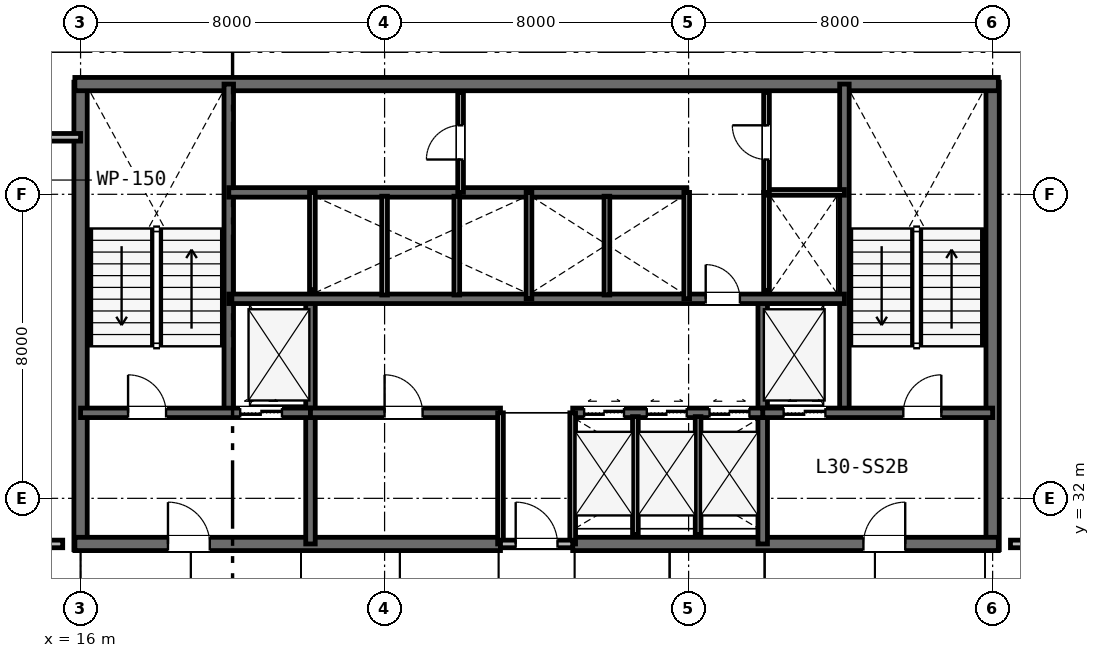
"""IFC4 building model, lengths in metres.
Left out: names, types, materials, properties, quantities, classifications, styles, units other than length and angle.
Written with IfcOpenShell. Run it as: python <this file> out.ifc"""

import sys

from ifc_helpers import new_model, si_unit, direction, frame, frame_2d, origin, place, context, subcontext, project, spatial, rectangle, extrude, element, fill, save


model = new_model("IFC4")
c1 = context("Model", 3, precision=1e-05, world=origin(), true_north=direction((0.0, 1.0)))
c2 = subcontext(c1, "Body", "Model", "MODEL_VIEW")
j1 = project(units=[si_unit("LENGTHUNIT", "METRE"), si_unit("PLANEANGLEUNIT", "RADIAN")], contexts=[c1])
p1 = place(None, origin())
s1 = spatial("IfcSite", under=j1, at=p1, CompositionType="ELEMENT")
p2 = place(p1, origin())
s2 = spatial("IfcBuilding", under=s1, at=p2, CompositionType="ELEMENT")
p3 = place(p2, frame((0.0, 0.0, 118.8)))
s3 = spatial("IfcBuildingStorey", under=s2, at=p3, CompositionType="ELEMENT", Elevation=118.8)
for number, where, z_axis, x_axis in (
    (1, (16.0, 30.65, 0.0), (0.0, 0.0, 1.0), (0.0, 1.0, 0.0)),
    (2, (40.0, 30.65, 0.0), (0.0, 0.0, 1.0), (0.0, 1.0, 0.0)),
):
    element("IfcWall", number, at=place(p3, frame(where, z_axis=z_axis, x_axis=x_axis)), inside=s3, PredefinedType="SHEAR", context=c2, shape_type="SweptSolid", body=[
        extrude(rectangle(XDim=12.3, YDim=0.35, at=frame_2d((6.15, 0.0))), origin(), (0.0, 0.0, 1.0), 3.6),
    ])
p4 = place(p3, frame((15.85, 42.9, 0.0), z_axis=(0.0, 0.0, 1.0), x_axis=(1.0, 0.0, 0.0)))
e3 = element("IfcWall", 3, at=p4, inside=s3, PredefinedType="SHEAR", context=c2, shape_type="SweptSolid", body=[
    extrude(rectangle(XDim=24.3, YDim=0.35, at=frame_2d((12.15, 0.0))), origin(), (0.0, 0.0, 1.0), 3.6),
])
p5 = place(p3, frame((15.85, 30.8, 0.0), z_axis=(0.0, 0.0, 1.0), x_axis=(1.0, 0.0, 0.0)))
e4 = element("IfcWall", 4, at=p5, inside=s3, PredefinedType="SHEAR", context=c2, shape_type="SweptSolid", body=[
    extrude(rectangle(XDim=11.2, YDim=0.35, at=frame_2d((5.6, 0.0))), origin(), (0.0, 0.0, 1.0), 3.6),
])
p6 = place(p5, frame((2.45, 0.0, 0.0)))
e5 = element("IfcOpeningElement", 5, at=p6, cuts=e4, PredefinedType="OPENING", context=c2, shape_type="SweptSolid", body=[
    extrude(rectangle(XDim=1.1, YDim=2.15, at=frame_2d((0.55, 1.075))), frame((0.0, 0.185, 0.0), z_axis=(0.0, -1.0, 0.0), x_axis=(1.0, 0.0, 0.0)), (0.0, 0.0, 1.0), 0.37),
])
p7 = place(p3, frame((28.95, 30.8, 0.0), z_axis=(0.0, 0.0, 1.0), x_axis=(1.0, 0.0, 0.0)))
e6 = element("IfcWall", 6, at=p7, inside=s3, PredefinedType="SHEAR", context=c2, shape_type="SweptSolid", body=[
    extrude(rectangle(XDim=11.2, YDim=0.35, at=frame_2d((5.6, 0.0))), origin(), (0.0, 0.0, 1.0), 3.6),
])
p8 = place(p7, frame((7.65, 0.0, 0.0)))
e7 = element("IfcOpeningElement", 7, at=p8, cuts=e6, PredefinedType="OPENING", context=c2, shape_type="SweptSolid", body=[
    extrude(rectangle(XDim=1.1, YDim=2.15, at=frame_2d((0.55, 1.075))), frame((0.0, 0.185, 0.0), z_axis=(0.0, -1.0, 0.0), x_axis=(1.0, 0.0, 0.0)), (0.0, 0.0, 1.0), 0.37),
])
for number, where, z_axis, x_axis in (
    (8, (19.9, 34.25, 0.0), (0.0, 0.0, 1.0), (0.0, 1.0, 0.0)),
    (9, (36.1, 34.25, 0.0), (0.0, 0.0, 1.0), (0.0, 1.0, 0.0)),
):
    element("IfcWall", number, at=place(p3, frame(where, z_axis=z_axis, x_axis=x_axis)), inside=s3, PredefinedType="SHEAR", context=c2, shape_type="SweptSolid", body=[
        extrude(rectangle(XDim=8.65, YDim=0.25, at=frame_2d((4.325, 0.0))), origin(), (0.0, 0.0, 1.0), 3.6),
    ])
for number, where, z_axis, x_axis in (
    (10, (22.05, 30.8, 0.0), (0.0, 0.0, 1.0), (0.0, 1.0, 0.0)),
    (11, (33.95, 30.8, 0.0), (0.0, 0.0, 1.0), (0.0, 1.0, 0.0)),
):
    element("IfcWall", number, at=place(p3, frame(where, z_axis=z_axis, x_axis=x_axis)), inside=s3, PredefinedType="SHEAR", context=c2, shape_type="SweptSolid", body=[
        extrude(rectangle(XDim=6.45, YDim=0.25, at=frame_2d((3.225, 0.0))), origin(), (0.0, 0.0, 1.0), 3.6),
    ])
p9 = place(p3, frame((16.0, 34.25, 0.0), z_axis=(0.0, 0.0, 1.0), x_axis=(1.0, 0.0, 0.0)))
e12 = element("IfcWall", 12, at=p9, inside=s3, PredefinedType="SHEAR", context=c2, shape_type="SweptSolid", body=[
    extrude(rectangle(XDim=6.05, YDim=0.25, at=frame_2d((3.025, 0.0))), origin(), (0.0, 0.0, 1.0), 3.6),
])
p10 = place(p9, frame((1.25, 0.0, 0.0)))
e13 = element("IfcOpeningElement", 13, at=p10, cuts=e12, PredefinedType="OPENING", context=c2, shape_type="SweptSolid", body=[
    extrude(rectangle(XDim=1.0, YDim=2.15, at=frame_2d((0.5, 1.075))), frame((0.0, 0.135, 0.0), z_axis=(0.0, -1.0, 0.0), x_axis=(1.0, 0.0, 0.0)), (0.0, 0.0, 1.0), 0.27),
])
p11 = place(p9, frame((4.2, 0.0, 0.0)))
e14 = element("IfcOpeningElement", 14, at=p11, cuts=e12, PredefinedType="OPENING", context=c2, shape_type="SweptSolid", body=[
    extrude(rectangle(XDim=1.1, YDim=2.15, at=frame_2d((0.55, 1.075))), frame((0.0, 0.135, 0.0), z_axis=(0.0, -1.0, 0.0), x_axis=(1.0, 0.0, 0.0)), (0.0, 0.0, 1.0), 0.27),
])
p12 = place(p3, frame((33.95, 34.25, 0.0), z_axis=(0.0, 0.0, 1.0), x_axis=(1.0, 0.0, 0.0)))
e15 = element("IfcWall", 15, at=p12, inside=s3, PredefinedType="SHEAR", context=c2, shape_type="SweptSolid", body=[
    extrude(rectangle(XDim=6.05, YDim=0.25, at=frame_2d((3.025, 0.0))), origin(), (0.0, 0.0, 1.0), 3.6),
])
p13 = place(p12, frame((3.7, 0.0, 0.0)))
e16 = element("IfcOpeningElement", 16, at=p13, cuts=e15, PredefinedType="OPENING", context=c2, shape_type="SweptSolid", body=[
    extrude(rectangle(XDim=1.0, YDim=2.15, at=frame_2d((0.5, 1.075))), frame((0.0, 0.135, 0.0), z_axis=(0.0, -1.0, 0.0), x_axis=(1.0, 0.0, 0.0)), (0.0, 0.0, 1.0), 0.27),
])
p14 = place(p12, frame((0.55, 0.0, 0.0)))
e17 = element("IfcOpeningElement", 17, at=p14, cuts=e15, PredefinedType="OPENING", context=c2, shape_type="SweptSolid", body=[
    extrude(rectangle(XDim=1.1, YDim=2.15, at=frame_2d((0.55, 1.075))), frame((0.0, 0.135, 0.0), z_axis=(0.0, -1.0, 0.0), x_axis=(1.0, 0.0, 0.0)), (0.0, 0.0, 1.0), 0.27),
])
p15 = place(p3, frame((22.05, 34.25, 0.0), z_axis=(0.0, 0.0, 1.0), x_axis=(1.0, 0.0, 0.0)))
e18 = element("IfcWall", 18, at=p15, inside=s3, PredefinedType="SHEAR", context=c2, shape_type="SweptSolid", body=[
    extrude(rectangle(XDim=5.0, YDim=0.25, at=frame_2d((2.5, 0.0))), origin(), (0.0, 0.0, 1.0), 3.6),
])
p16 = place(p15, frame((1.95, 0.0, 0.0)))
e19 = element("IfcOpeningElement", 19, at=p16, cuts=e18, PredefinedType="OPENING", context=c2, shape_type="SweptSolid", body=[
    extrude(rectangle(XDim=1.0, YDim=2.15, at=frame_2d((0.5, 1.075))), frame((0.0, 0.135, 0.0), z_axis=(0.0, -1.0, 0.0), x_axis=(1.0, 0.0, 0.0)), (0.0, 0.0, 1.0), 0.27),
])
p17 = place(p3, frame((28.95, 34.25, 0.0), z_axis=(0.0, 0.0, 1.0), x_axis=(1.0, 0.0, 0.0)))
e20 = element("IfcWall", 20, at=p17, inside=s3, PredefinedType="SHEAR", context=c2, shape_type="SweptSolid", body=[
    extrude(rectangle(XDim=5.0, YDim=0.25, at=frame_2d((2.5, 0.0))), origin(), (0.0, 0.0, 1.0), 3.6),
])
p18 = place(p17, frame((0.3, 0.0, 0.0)))
e21 = element("IfcOpeningElement", 21, at=p18, cuts=e20, PredefinedType="OPENING", context=c2, shape_type="SweptSolid", body=[
    extrude(rectangle(XDim=1.05, YDim=2.15, at=frame_2d((0.525, 1.075))), frame((0.0, 0.135, 0.0), z_axis=(0.0, -1.0, 0.0), x_axis=(1.0, 0.0, 0.0)), (0.0, 0.0, 1.0), 0.27),
])
p19 = place(p17, frame((1.95, 0.0, 0.0)))
e22 = element("IfcOpeningElement", 22, at=p19, cuts=e20, PredefinedType="OPENING", context=c2, shape_type="SweptSolid", body=[
    extrude(rectangle(XDim=1.05, YDim=2.15, at=frame_2d((0.525, 1.075))), frame((0.0, 0.135, 0.0), z_axis=(0.0, -1.0, 0.0), x_axis=(1.0, 0.0, 0.0)), (0.0, 0.0, 1.0), 0.27),
])
p20 = place(p17, frame((3.6, 0.0, 0.0)))
e23 = element("IfcOpeningElement", 23, at=p20, cuts=e20, PredefinedType="OPENING", context=c2, shape_type="SweptSolid", body=[
    extrude(rectangle(XDim=1.05, YDim=2.15, at=frame_2d((0.525, 1.075))), frame((0.0, 0.135, 0.0), z_axis=(0.0, -1.0, 0.0), x_axis=(1.0, 0.0, 0.0)), (0.0, 0.0, 1.0), 0.27),
])
p21 = place(p3, frame((19.9, 37.25, 0.0), z_axis=(0.0, 0.0, 1.0), x_axis=(1.0, 0.0, 0.0)))
e24 = element("IfcWall", 24, at=p21, inside=s3, PredefinedType="SHEAR", context=c2, shape_type="SweptSolid", body=[
    extrude(rectangle(XDim=16.2, YDim=0.25, at=frame_2d((8.1, 0.0))), origin(), (0.0, 0.0, 1.0), 3.6),
])
p22 = place(p21, frame((12.55, 0.0, 0.0)))
e25 = element("IfcOpeningElement", 25, at=p22, cuts=e24, PredefinedType="OPENING", context=c2, shape_type="SweptSolid", body=[
    extrude(rectangle(XDim=0.9, YDim=2.15, at=frame_2d((0.45, 1.075))), frame((0.0, 0.135, 0.0), z_axis=(0.0, -1.0, 0.0), x_axis=(1.0, 0.0, 0.0)), (0.0, 0.0, 1.0), 0.27),
])
p23 = place(p3, frame((19.9, 40.05, 0.0), z_axis=(0.0, 0.0, 1.0), x_axis=(1.0, 0.0, 0.0)))
e26 = element("IfcWall", 26, at=p23, inside=s3, PredefinedType="SHEAR", context=c2, shape_type="SweptSolid", body=[
    extrude(rectangle(XDim=12.05, YDim=0.25, at=frame_2d((6.025, 0.0))), origin(), (0.0, 0.0, 1.0), 3.6),
])
p24 = place(p3, frame((27.05, 30.8, 0.0), z_axis=(0.0, 0.0, 1.0), x_axis=(0.0, 1.0, 0.0)))
e27 = element("IfcWall", 27, at=p24, inside=s3, PredefinedType="PLUMBINGWALL", context=c2, shape_type="SweptSolid", body=[
    extrude(rectangle(XDim=3.45, YDim=0.15, at=frame_2d((1.725, 0.0))), origin(), (0.0, 0.0, 1.0), 3.01),
])
p25 = place(p3, frame((28.95, 30.8, 0.0), z_axis=(0.0, 0.0, 1.0), x_axis=(0.0, 1.0, 0.0)))
e28 = element("IfcWall", 28, at=p25, inside=s3, PredefinedType="PLUMBINGWALL", context=c2, shape_type="SweptSolid", body=[
    extrude(rectangle(XDim=3.45, YDim=0.15, at=frame_2d((1.725, 0.0))), origin(), (0.0, 0.0, 1.0), 3.33),
])
p26 = place(p3, frame((27.05, 30.8, 0.0), z_axis=(0.0, 0.0, 1.0), x_axis=(1.0, 0.0, 0.0)))
e29 = element("IfcWall", 29, at=p26, inside=s3, PredefinedType="PARTITIONING", context=c2, shape_type="SweptSolid", body=[
    extrude(rectangle(XDim=1.9, YDim=0.2, at=frame_2d((0.95, 0.0))), origin(), (0.0, 0.0, 1.0), 3.01),
])
p27 = place(p26, frame((0.4, 0.0, 0.0)))
e30 = element("IfcOpeningElement", 30, at=p27, cuts=e29, PredefinedType="OPENING", context=c2, shape_type="SweptSolid", body=[
    extrude(rectangle(XDim=1.1, YDim=2.15, at=frame_2d((0.55, 1.075))), frame((0.0, 0.11, 0.0), z_axis=(0.0, -1.0, 0.0), x_axis=(1.0, 0.0, 0.0)), (0.0, 0.0, 1.0), 0.22),
])
for number, where, z_axis, x_axis in (
    (31, (30.6, 31.05, 0.0), (0.0, 0.0, 1.0), (0.0, 1.0, 0.0)),
    (32, (32.25, 31.05, 0.0), (0.0, 0.0, 1.0), (0.0, 1.0, 0.0)),
):
    element("IfcWall", number, at=place(p3, frame(where, z_axis=z_axis, x_axis=x_axis)), inside=s3, PredefinedType="PLUMBINGWALL", context=c2, shape_type="SweptSolid", body=[
        extrude(rectangle(XDim=3.1, YDim=0.15, at=frame_2d((1.55, 0.0))), origin(), (0.0, 0.0, 1.0), 3.33),
    ])
p28 = place(p3, frame((22.1, 37.49, 0.0), z_axis=(0.0, 0.0, 1.0), x_axis=(0.0, 1.0, 0.0)))
e33 = element("IfcWall", 33, at=p28, inside=s3, PredefinedType="PLUMBINGWALL", context=c2, shape_type="SweptSolid", body=[
    extrude(rectangle(XDim=2.56, YDim=0.15, at=frame_2d((1.28, 0.0))), origin(), (0.0, 0.0, 1.0), 3.33),
])
p29 = place(p3, frame((27.8, 37.25, 0.0), z_axis=(0.0, 0.0, 1.0), x_axis=(0.0, 1.0, 0.0)))
e34 = element("IfcWall", 34, at=p29, inside=s3, PredefinedType="PLUMBINGWALL", context=c2, shape_type="SweptSolid", body=[
    extrude(rectangle(XDim=2.8, YDim=0.15, at=frame_2d((1.4, 0.0))), origin(), (0.0, 0.0, 1.0), 3.33),
])
for number, where, z_axis, x_axis in (
    (35, (24.0, 37.35, 0.0), (0.0, 0.0, 1.0), (0.0, 1.0, 0.0)),
    (36, (25.9, 37.35, 0.0), (0.0, 0.0, 1.0), (0.0, 1.0, 0.0)),
):
    element("IfcWall", number, at=place(p3, frame(where, z_axis=z_axis, x_axis=x_axis)), inside=s3, PredefinedType="PLUMBINGWALL", context=c2, shape_type="SweptSolid", body=[
        extrude(rectangle(XDim=2.6, YDim=0.15, at=frame_2d((1.3, 0.0))), origin(), (0.0, 0.0, 1.0), 3.33),
    ])
p30 = place(p3, frame((31.95, 37.25, 0.0), z_axis=(0.0, 0.0, 1.0), x_axis=(0.0, 1.0, 0.0)))
e37 = element("IfcWall", 37, at=p30, inside=s3, PredefinedType="PLUMBINGWALL", context=c2, shape_type="SweptSolid", body=[
    extrude(rectangle(XDim=2.8, YDim=0.15, at=frame_2d((1.4, 0.0))), origin(), (0.0, 0.0, 1.0), 3.33),
])
p31 = place(p3, frame((29.85, 37.35, 0.0), z_axis=(0.0, 0.0, 1.0), x_axis=(0.0, 1.0, 0.0)))
e38 = element("IfcWall", 38, at=p31, inside=s3, PredefinedType="PLUMBINGWALL", context=c2, shape_type="SweptSolid", body=[
    extrude(rectangle(XDim=2.6, YDim=0.15, at=frame_2d((1.3, 0.0))), origin(), (0.0, 0.0, 1.0), 3.33),
])
p32 = place(p3, frame((34.05, 37.473, 0.0), z_axis=(0.0, 0.0, 1.0), x_axis=(0.0, 1.0, 0.0)))
e39 = element("IfcWall", 39, at=p32, inside=s3, PredefinedType="PLUMBINGWALL", context=c2, shape_type="SweptSolid", body=[
    extrude(rectangle(XDim=2.577, YDim=0.15, at=frame_2d((1.288, 0.0))), origin(), (0.0, 0.0, 1.0), 3.33),
])
p33 = place(p3, frame((34.05, 40.05, 0.0), z_axis=(0.0, 0.0, 1.0), x_axis=(1.0, 0.0, 0.0)))
e40 = element("IfcWall", 40, at=p33, inside=s3, PredefinedType="PARTITIONING", context=c2, shape_type="SweptSolid", body=[
    extrude(rectangle(XDim=2.05, YDim=0.15, at=frame_2d((1.025, 0.0))), origin(), (0.0, 0.0, 1.0), 3.33),
])
p34 = place(p3, frame((34.05, 40.05, 0.0), z_axis=(0.0, 0.0, 1.0), x_axis=(0.0, 1.0, 0.0)))
e41 = element("IfcWall", 41, at=p34, inside=s3, PredefinedType="PARTITIONING", context=c2, shape_type="SweptSolid", body=[
    extrude(rectangle(XDim=2.63, YDim=0.15, at=frame_2d((1.315, 0.0))), origin(), (0.0, 0.0, 1.0), 3.33),
])
p35 = place(p34, frame((0.865, 0.0, 0.0)))
e42 = element("IfcOpeningElement", 42, at=p35, cuts=e41, PredefinedType="OPENING", context=c2, shape_type="SweptSolid", body=[
    extrude(rectangle(XDim=0.9, YDim=2.15, at=frame_2d((0.45, 1.075))), frame((0.0, 0.085, 0.0), z_axis=(0.0, -1.0, 0.0), x_axis=(1.0, 0.0, 0.0)), (0.0, 0.0, 1.0), 0.17),
])
p36 = place(p3, frame((26.0, 40.05, 0.0), z_axis=(0.0, 0.0, 1.0), x_axis=(0.0, 1.0, 0.0)))
e43 = element("IfcWall", 43, at=p36, inside=s3, PredefinedType="PARTITIONING", context=c2, shape_type="SweptSolid", body=[
    extrude(rectangle(XDim=2.63, YDim=0.15, at=frame_2d((1.315, 0.0))), origin(), (0.0, 0.0, 1.0), 3.33),
])
p37 = place(p36, frame((0.865, 0.0, 0.0)))
e44 = element("IfcOpeningElement", 44, at=p37, cuts=e43, PredefinedType="OPENING", context=c2, shape_type="SweptSolid", body=[
    extrude(rectangle(XDim=0.9, YDim=2.15, at=frame_2d((0.45, 1.075))), frame((0.0, 0.085, 0.0), z_axis=(0.0, -1.0, 0.0), x_axis=(1.0, 0.0, 0.0)), (0.0, 0.0, 1.0), 0.17),
])
p38 = place(p3, frame((11.4, 30.8, 0.0), z_axis=(0.0, 0.0, 1.0), x_axis=(1.0, 0.0, 0.0)))
e45 = element("IfcWall", 45, at=p38, inside=s3, PredefinedType="PARTITIONING", context=c2, shape_type="SweptSolid", body=[
    extrude(rectangle(XDim=4.13, YDim=0.2, at=frame_2d((2.065, 0.0))), origin(), (0.0, 0.0, 1.0), 2.87),
])
p39 = place(p3, frame((40.47, 30.8, 0.0), z_axis=(0.0, 0.0, 1.0), x_axis=(1.0, 0.0, 0.0)))
e46 = element("IfcWall", 46, at=p39, inside=s3, PredefinedType="PARTITIONING", context=c2, shape_type="SweptSolid", body=[
    extrude(rectangle(XDim=1.73, YDim=0.2, at=frame_2d((0.865, 0.0))), origin(), (0.0, 0.0, 1.0), 2.87),
])
p40 = place(p3, frame((0.1, 41.5, 0.0), z_axis=(0.0, 0.0, 1.0), x_axis=(1.0, 0.0, 0.0)))
e47 = element("IfcWall", 47, at=p40, inside=s3, PredefinedType="PARTITIONING", context=c2, shape_type="SweptSolid", body=[
    extrude(rectangle(XDim=15.9, YDim=0.2, at=frame_2d((7.95, 0.0))), origin(), (0.0, 0.0, 1.0), 2.87),
])
p41 = place(p40, frame((9.877, 0.0, 0.0)))
e48 = element("IfcOpeningElement", 48, at=p41, cuts=e47, PredefinedType="OPENING", context=c2, shape_type="SweptSolid", body=[
    extrude(rectangle(XDim=0.95, YDim=2.15, at=frame_2d((0.475, 1.075))), frame((0.0, 0.11, 0.0), z_axis=(0.0, -1.0, 0.0), x_axis=(1.0, 0.0, 0.0)), (0.0, 0.0, 1.0), 0.22),
])
p42 = place(p27, origin())
e49 = element("IfcDoor", 49, at=p42, inside=s3, OperationType="SINGLE_SWING_LEFT", PredefinedType="DOOR", context=c2, shape_type="SweptSolid", body=[
    extrude(rectangle(XDim=1.1, YDim=2.15, at=frame_2d((0.55, 1.075))), frame((0.0, 0.025, 0.0), z_axis=(0.0, -1.0, 0.0), x_axis=(1.0, 0.0, 0.0)), (0.0, 0.0, 1.0), 0.05),
])
fill(e30, e49)
p43 = place(p10, origin())
e50 = element("IfcDoor", 50, at=p43, inside=s3, OperationType="SINGLE_SWING_LEFT", PredefinedType="DOOR", context=c2, shape_type="SweptSolid", body=[
    extrude(rectangle(XDim=1.0, YDim=2.15, at=frame_2d((0.5, 1.075))), frame((0.0, 0.025, 0.0), z_axis=(0.0, -1.0, 0.0), x_axis=(1.0, 0.0, 0.0)), (0.0, 0.0, 1.0), 0.05),
])
fill(e13, e50)
p44 = place(p13, origin())
e51 = element("IfcDoor", 51, at=p44, inside=s3, OperationType="SINGLE_SWING_RIGHT", PredefinedType="DOOR", context=c2, shape_type="SweptSolid", body=[
    extrude(rectangle(XDim=1.0, YDim=2.15, at=frame_2d((0.5, 1.075))), frame((0.0, 0.025, 0.0), z_axis=(0.0, -1.0, 0.0), x_axis=(1.0, 0.0, 0.0)), (0.0, 0.0, 1.0), 0.05),
])
fill(e16, e51)
p45 = place(p6, origin())
e52 = element("IfcDoor", 52, at=p45, inside=s3, OperationType="SINGLE_SWING_LEFT", PredefinedType="DOOR", context=c2, shape_type="SweptSolid", body=[
    extrude(rectangle(XDim=1.1, YDim=2.15, at=frame_2d((0.55, 1.075))), frame((0.0, 0.025, 0.0), z_axis=(0.0, -1.0, 0.0), x_axis=(1.0, 0.0, 0.0)), (0.0, 0.0, 1.0), 0.05),
])
fill(e5, e52)
p46 = place(p8, origin())
e53 = element("IfcDoor", 53, at=p46, inside=s3, OperationType="SINGLE_SWING_RIGHT", PredefinedType="DOOR", context=c2, shape_type="SweptSolid", body=[
    extrude(rectangle(XDim=1.1, YDim=2.15, at=frame_2d((0.55, 1.075))), frame((0.0, 0.025, 0.0), z_axis=(0.0, -1.0, 0.0), x_axis=(1.0, 0.0, 0.0)), (0.0, 0.0, 1.0), 0.05),
])
fill(e7, e53)
p47 = place(p16, origin())
e54 = element("IfcDoor", 54, at=p47, inside=s3, OperationType="SINGLE_SWING_LEFT", PredefinedType="DOOR", context=c2, shape_type="SweptSolid", body=[
    extrude(rectangle(XDim=1.0, YDim=2.15, at=frame_2d((0.5, 1.075))), frame((0.0, 0.025, 0.0), z_axis=(0.0, -1.0, 0.0), x_axis=(1.0, 0.0, 0.0)), (0.0, 0.0, 1.0), 0.05),
])
fill(e19, e54)
p48 = place(p22, origin())
e55 = element("IfcDoor", 55, at=p48, inside=s3, OperationType="SINGLE_SWING_LEFT", PredefinedType="DOOR", context=c2, shape_type="SweptSolid", body=[
    extrude(rectangle(XDim=0.9, YDim=2.15, at=frame_2d((0.45, 1.075))), frame((0.0, 0.025, 0.0), z_axis=(0.0, -1.0, 0.0), x_axis=(1.0, 0.0, 0.0)), (0.0, 0.0, 1.0), 0.05),
])
fill(e25, e55)
p49 = place(p35, origin())
e56 = element("IfcDoor", 56, at=p49, inside=s3, OperationType="SINGLE_SWING_RIGHT", PredefinedType="DOOR", context=c2, shape_type="SweptSolid", body=[
    extrude(rectangle(XDim=0.9, YDim=2.15, at=frame_2d((0.45, 1.075))), frame((0.0, 0.025, 0.0), z_axis=(0.0, -1.0, 0.0), x_axis=(1.0, 0.0, 0.0)), (0.0, 0.0, 1.0), 0.05),
])
fill(e42, e56)
p50 = place(p37, origin())
e57 = element("IfcDoor", 57, at=p50, inside=s3, OperationType="SINGLE_SWING_LEFT", PredefinedType="DOOR", context=c2, shape_type="SweptSolid", body=[
    extrude(rectangle(XDim=0.9, YDim=2.15, at=frame_2d((0.45, 1.075))), frame((0.0, 0.025, 0.0), z_axis=(0.0, -1.0, 0.0), x_axis=(1.0, 0.0, 0.0)), (0.0, 0.0, 1.0), 0.05),
])
fill(e44, e57)
p51 = place(p11, origin())
e58 = element("IfcDoor", 58, at=p51, inside=s3, OperationType="DOUBLE_DOOR_SLIDING", PredefinedType="DOOR", context=c2, shape_type="SweptSolid", body=[
    extrude(rectangle(XDim=1.1, YDim=2.15, at=frame_2d((0.55, 1.075))), frame((0.0, 0.025, 0.0), z_axis=(0.0, -1.0, 0.0), x_axis=(1.0, 0.0, 0.0)), (0.0, 0.0, 1.0), 0.05),
])
fill(e14, e58)
p52 = place(p14, origin())
e59 = element("IfcDoor", 59, at=p52, inside=s3, OperationType="DOUBLE_DOOR_SLIDING", PredefinedType="DOOR", context=c2, shape_type="SweptSolid", body=[
    extrude(rectangle(XDim=1.1, YDim=2.15, at=frame_2d((0.55, 1.075))), frame((0.0, 0.025, 0.0), z_axis=(0.0, -1.0, 0.0), x_axis=(1.0, 0.0, 0.0)), (0.0, 0.0, 1.0), 0.05),
])
fill(e17, e59)
p53 = place(p18, origin())
e60 = element("IfcDoor", 60, at=p53, inside=s3, OperationType="DOUBLE_DOOR_SLIDING", PredefinedType="DOOR", context=c2, shape_type="SweptSolid", body=[
    extrude(rectangle(XDim=1.05, YDim=2.15, at=frame_2d((0.525, 1.075))), frame((0.0, 0.025, 0.0), z_axis=(0.0, -1.0, 0.0), x_axis=(1.0, 0.0, 0.0)), (0.0, 0.0, 1.0), 0.05),
])
fill(e21, e60)
p54 = place(p19, origin())
e61 = element("IfcDoor", 61, at=p54, inside=s3, OperationType="DOUBLE_DOOR_SLIDING", PredefinedType="DOOR", context=c2, shape_type="SweptSolid", body=[
    extrude(rectangle(XDim=1.05, YDim=2.15, at=frame_2d((0.525, 1.075))), frame((0.0, 0.025, 0.0), z_axis=(0.0, -1.0, 0.0), x_axis=(1.0, 0.0, 0.0)), (0.0, 0.0, 1.0), 0.05),
])
fill(e22, e61)
p55 = place(p20, origin())
e62 = element("IfcDoor", 62, at=p55, inside=s3, OperationType="DOUBLE_DOOR_SLIDING", PredefinedType="DOOR", context=c2, shape_type="SweptSolid", body=[
    extrude(rectangle(XDim=1.05, YDim=2.15, at=frame_2d((0.525, 1.075))), frame((0.0, 0.025, 0.0), z_axis=(0.0, -1.0, 0.0), x_axis=(1.0, 0.0, 0.0)), (0.0, 0.0, 1.0), 0.05),
])
fill(e23, e62)
save(model, sys.argv[1])
